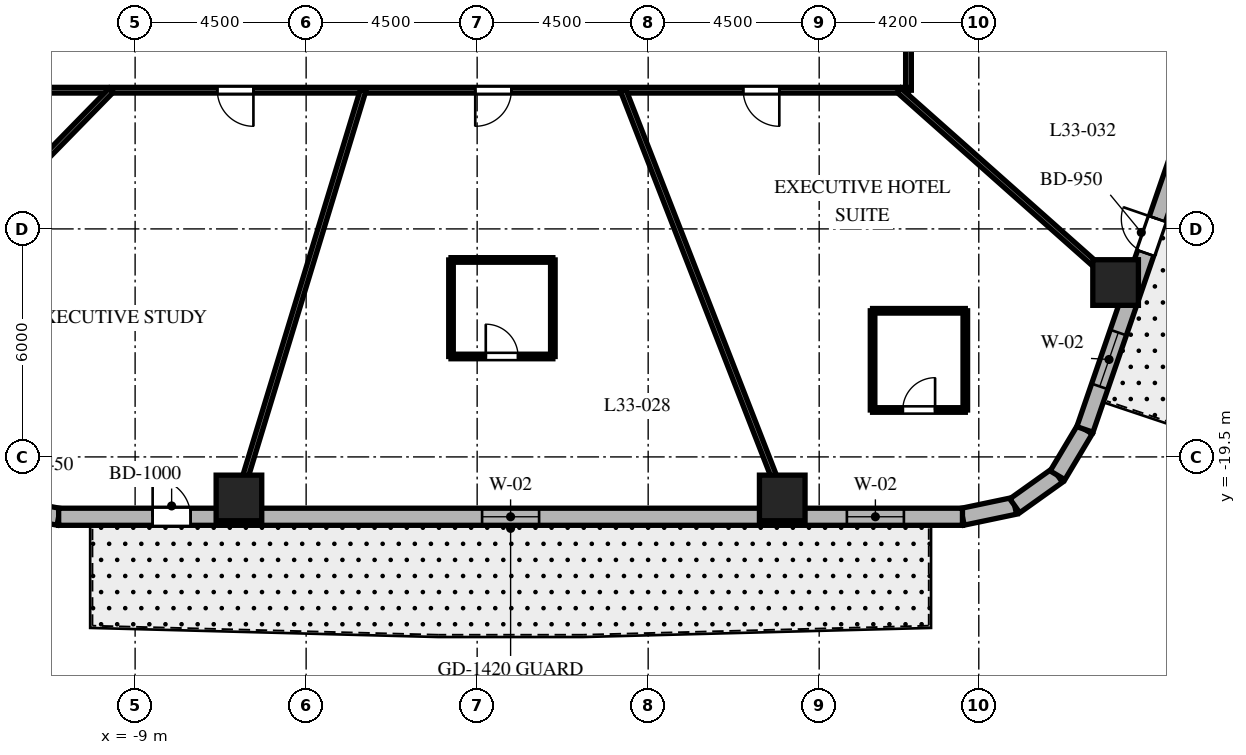
"""IFC4 building model, lengths in metres.
Left out: names, types, materials, properties, quantities, classifications, styles, units other than length and angle.
Written with IfcOpenShell. Run it as: python <this file> out.ifc"""

import sys

from ifc_helpers import new_model, si_unit, direction, frame, frame_2d, origin, origin_2d, place, context, subcontext, project, spatial, rectangle, extrude, element, fill, save


model = new_model("IFC4")
c1 = context("Model", 3, precision=1e-05, world=origin(), true_north=direction((0.0, 1.0)))
c2 = subcontext(c1, "Body", "Model", "MODEL_VIEW")
j1 = project(units=[si_unit("LENGTHUNIT", "METRE"), si_unit("PLANEANGLEUNIT", "RADIAN")], contexts=[c1])
p1 = place(None, origin())
s1 = spatial("IfcSite", under=j1, at=p1, CompositionType="ELEMENT")
p2 = place(p1, origin())
s2 = spatial("IfcBuilding", under=s1, at=p2, CompositionType="ELEMENT")
p3 = place(p2, frame((0.0, 0.0, 135.8)))
s3 = spatial("IfcBuildingStorey", under=s2, at=p3, CompositionType="ELEMENT", Elevation=135.8)
for number, where, z_axis, x_axis in (
    (1, (-6.268, -20.58, 0.0), (0.0, 0.0, 1.0), (1.0, 0.0, 0.0)),
    (2, (8.028, -20.58, 0.0), (0.0, 0.0, 1.0), (1.0, 0.0, 0.0)),
    (3, (16.8, -14.911, 0.0), (0.0, 0.0, 1.0), (1.0, 0.0, 0.0)),
):
    element("IfcColumn", number, at=place(p3, frame(where, z_axis=z_axis, x_axis=x_axis)), inside=s3, PredefinedType="COLUMN", context=c2, shape_type="SweptSolid", body=[
        extrude(rectangle(XDim=1.2, YDim=1.2, at=origin_2d()), origin(), (0.0, 0.0, 1.0), 3.7),
    ])
p4 = place(p3, frame((-12.259, -20.84, 0.0), z_axis=(0.0, 0.0, 1.0), x_axis=(0.982730354425, -0.185043374624, 0.0)))
e4 = element("IfcWall", 4, at=p4, inside=s3, PredefinedType="SOLIDWALL", context=c2, shape_type="SweptSolid", body=[
    extrude(rectangle(XDim=1.269, YDim=0.45, at=frame_2d((0.635, 0.0))), origin(), (0.0, 0.0, 1.0), 3.38),
])
p5 = place(p3, frame((12.771, -21.075, 0.0), z_axis=(0.0, 0.0, 1.0), x_axis=(0.97874281988, 0.205091424819, 0.0)))
e5 = element("IfcWall", 5, at=p5, inside=s3, PredefinedType="SOLIDWALL", context=c2, shape_type="SweptSolid", body=[
    extrude(rectangle(XDim=1.406, YDim=0.45, at=frame_2d((0.703, 0.0))), origin(), (0.0, 0.0, 1.0), 3.38),
])
p6 = place(p3, frame((14.146, -20.787, 0.0), z_axis=(0.0, 0.0, 1.0), x_axis=(0.814162929117, 0.580636482536, 0.0)))
e6 = element("IfcWall", 6, at=p6, inside=s3, PredefinedType="SOLIDWALL", context=c2, shape_type="SweptSolid", body=[
    extrude(rectangle(XDim=1.382, YDim=0.45, at=frame_2d((0.691, 0.0))), origin(), (0.0, 0.0, 1.0), 3.38),
])
p7 = place(p3, frame((15.272, -19.984, 0.0), z_axis=(0.0, 0.0, 1.0), x_axis=(0.512579347361, 0.858639862025, 0.0)))
e7 = element("IfcWall", 7, at=p7, inside=s3, PredefinedType="SOLIDWALL", context=c2, shape_type="SweptSolid", body=[
    extrude(rectangle(XDim=1.406, YDim=0.45, at=frame_2d((0.703, 0.0))), origin(), (0.0, 0.0, 1.0), 3.38),
])
p8 = place(p3, frame((-11.012, -21.075, 0.0), z_axis=(0.0, 0.0, 1.0), x_axis=(1.0, 0.0, 0.0)))
e8 = element("IfcWall", 8, at=p8, inside=s3, PredefinedType="SOLIDWALL", context=c2, shape_type="SweptSolid", body=[
    extrude(rectangle(XDim=23.782, YDim=0.45, at=frame_2d((11.891, 0.0))), origin(), (0.0, 0.0, 1.0), 3.38),
])
p9 = place(p8, frame((2.473, 0.0, 0.0)))
e9 = element("IfcOpeningElement", 9, at=p9, cuts=e8, PredefinedType="OPENING", context=c2, shape_type="SweptSolid", body=[
    extrude(rectangle(XDim=1.0, YDim=2.15, at=frame_2d((0.5, 1.075))), frame((0.0, 0.235, 0.0), z_axis=(0.0, -1.0, 0.0), x_axis=(1.0, 0.0, 0.0)), (0.0, 0.0, 1.0), 0.47),
])
p10 = place(p8, frame((11.142, 0.0, 0.8)))
e10 = element("IfcOpeningElement", 10, at=p10, cuts=e8, PredefinedType="OPENING", context=c2, shape_type="SweptSolid", body=[
    extrude(rectangle(XDim=1.5, YDim=1.8, at=frame_2d((0.75, 0.9))), frame((0.0, 0.235, 0.0), z_axis=(0.0, -1.0, 0.0), x_axis=(1.0, 0.0, 0.0)), (0.0, 0.0, 1.0), 0.47),
])
p11 = place(p8, frame((20.741, 0.0, 0.8)))
e11 = element("IfcOpeningElement", 11, at=p11, cuts=e8, PredefinedType="OPENING", context=c2, shape_type="SweptSolid", body=[
    extrude(rectangle(XDim=1.5, YDim=1.8, at=frame_2d((0.75, 0.9))), frame((0.0, 0.235, 0.0), z_axis=(0.0, -1.0, 0.0), x_axis=(1.0, 0.0, 0.0)), (0.0, 0.0, 1.0), 0.47),
])
p12 = place(p3, frame((15.992, -18.777, 0.0), z_axis=(0.0, 0.0, 1.0), x_axis=(0.325606988926, 0.945505202927, 0.0)))
e12 = element("IfcWall", 12, at=p12, inside=s3, PredefinedType="SOLIDWALL", context=c2, shape_type="SweptSolid", body=[
    extrude(rectangle(XDim=19.669, YDim=0.45, at=frame_2d((9.835, 0.0))), origin(), (0.0, 0.0, 1.0), 3.38),
])
p13 = place(p12, frame((4.909, 0.0, 0.0)))
e13 = element("IfcOpeningElement", 13, at=p13, cuts=e12, PredefinedType="OPENING", context=c2, shape_type="SweptSolid", body=[
    extrude(rectangle(XDim=0.95, YDim=2.15, at=frame_2d((0.475, 1.075))), frame((0.0, 0.235, 0.0), z_axis=(0.0, -1.0, 0.0), x_axis=(1.0, 0.0, 0.0)), (0.0, 0.0, 1.0), 0.47),
])
p14 = place(p12, frame((1.197, 0.0, 0.8)))
e14 = element("IfcOpeningElement", 14, at=p14, cuts=e12, PredefinedType="OPENING", context=c2, shape_type="SweptSolid", body=[
    extrude(rectangle(XDim=1.5, YDim=1.8, at=frame_2d((0.75, 0.9))), frame((0.0, 0.235, 0.0), z_axis=(0.0, -1.0, 0.0), x_axis=(1.0, 0.0, 0.0)), (0.0, 0.0, 1.0), 0.47),
])
p15 = place(p12, frame((9.03, 0.0, 0.8)))
e15 = element("IfcOpeningElement", 15, at=p15, cuts=e12, PredefinedType="OPENING", context=c2, shape_type="SweptSolid", body=[
    extrude(rectangle(XDim=1.5, YDim=1.8, at=frame_2d((0.75, 0.9))), frame((0.0, 0.235, 0.0), z_axis=(0.0, -1.0, 0.0), x_axis=(1.0, 0.0, 0.0)), (0.0, 0.0, 1.0), 0.47),
])
p16 = place(p12, frame((16.918, 0.0, 0.8)))
e16 = element("IfcOpeningElement", 16, at=p16, cuts=e12, PredefinedType="OPENING", context=c2, shape_type="SweptSolid", body=[
    extrude(rectangle(XDim=1.5, YDim=1.8, at=frame_2d((0.75, 0.9))), frame((0.0, 0.235, 0.0), z_axis=(0.0, -1.0, 0.0), x_axis=(1.0, 0.0, 0.0)), (0.0, 0.0, 1.0), 0.47),
])
p17 = place(p3, frame((11.35, 9.85, 0.0), z_axis=(0.0, 0.0, 1.0), x_axis=(0.0, -1.0, 0.0)))
e17 = element("IfcWall", 17, at=p17, inside=s3, PredefinedType="PARTITIONING", context=c2, shape_type="SweptSolid", body=[
    extrude(rectangle(XDim=19.7, YDim=0.15, at=frame_2d((9.85, 0.0))), origin(), (0.0, 0.0, 1.0), 2.82),
])
p18 = place(p17, frame((3.008, 0.0, 0.0)))
e18 = element("IfcOpeningElement", 18, at=p18, cuts=e17, PredefinedType="OPENING", context=c2, shape_type="SweptSolid", body=[
    extrude(rectangle(XDim=0.95, YDim=2.03, at=frame_2d((0.475, 1.015))), frame((0.0, 0.085, 0.0), z_axis=(0.0, -1.0, 0.0), x_axis=(1.0, 0.0, 0.0)), (0.0, 0.0, 1.0), 0.17),
])
p19 = place(p17, frame((15.205, 0.0, 0.0)))
e19 = element("IfcOpeningElement", 19, at=p19, cuts=e17, PredefinedType="OPENING", context=c2, shape_type="SweptSolid", body=[
    extrude(rectangle(XDim=0.95, YDim=2.03, at=frame_2d((0.475, 1.015))), frame((0.0, 0.085, 0.0), z_axis=(0.0, -1.0, 0.0), x_axis=(1.0, 0.0, 0.0)), (0.0, 0.0, 1.0), 0.17),
])
p20 = place(p17, frame((8.836, 0.0, 0.0)))
e20 = element("IfcOpeningElement", 20, at=p20, cuts=e17, PredefinedType="OPENING", context=c2, shape_type="SweptSolid", body=[
    extrude(rectangle(XDim=0.95, YDim=2.03, at=frame_2d((0.475, 1.015))), frame((0.0, 0.085, 0.0), z_axis=(0.0, -1.0, 0.0), x_axis=(1.0, 0.0, 0.0)), (0.0, 0.0, 1.0), 0.17),
])
p21 = place(p3, frame((11.35, -9.85, 0.0), z_axis=(0.0, 0.0, 1.0), x_axis=(-1.0, 0.0, 0.0)))
e21 = element("IfcWall", 21, at=p21, inside=s3, PredefinedType="PARTITIONING", context=c2, shape_type="SweptSolid", body=[
    extrude(rectangle(XDim=22.7, YDim=0.15, at=frame_2d((11.35, 0.0))), origin(), (0.0, 0.0, 1.0), 2.82),
])
p22 = place(p21, frame((17.237, 0.0, 0.0)))
e22 = element("IfcOpeningElement", 22, at=p22, cuts=e21, PredefinedType="OPENING", context=c2, shape_type="SweptSolid", body=[
    extrude(rectangle(XDim=0.95, YDim=2.03, at=frame_2d((0.475, 1.015))), frame((0.0, 0.085, 0.0), z_axis=(0.0, -1.0, 0.0), x_axis=(1.0, 0.0, 0.0)), (0.0, 0.0, 1.0), 0.17),
])
p23 = place(p21, frame((10.45, 0.0, 0.0)))
e23 = element("IfcOpeningElement", 23, at=p23, cuts=e21, PredefinedType="OPENING", context=c2, shape_type="SweptSolid", body=[
    extrude(rectangle(XDim=0.95, YDim=2.03, at=frame_2d((0.475, 1.015))), frame((0.0, 0.085, 0.0), z_axis=(0.0, -1.0, 0.0), x_axis=(1.0, 0.0, 0.0)), (0.0, 0.0, 1.0), 0.17),
])
p24 = place(p21, frame((3.399, 0.0, 0.0)))
e24 = element("IfcOpeningElement", 24, at=p24, cuts=e21, PredefinedType="OPENING", context=c2, shape_type="SweptSolid", body=[
    extrude(rectangle(XDim=0.95, YDim=2.03, at=frame_2d((0.475, 1.015))), frame((0.0, 0.085, 0.0), z_axis=(0.0, -1.0, 0.0), x_axis=(1.0, 0.0, 0.0)), (0.0, 0.0, 1.0), 0.17),
])
p25 = place(p3, frame((-9.628, -9.85, 0.0), z_axis=(0.0, 0.0, 1.0), x_axis=(-0.698992824326, -0.715128681805, 0.0)))
e25 = element("IfcWall", 25, at=p25, inside=s3, PredefinedType="PARTITIONING", context=c2, shape_type="SweptSolid", body=[
    extrude(rectangle(XDim=8.579, YDim=0.15, at=frame_2d((4.29, 0.0))), origin(), (0.0, 0.0, 1.0), 2.52),
])
p26 = place(p3, frame((-3.0, -9.85, 0.0), z_axis=(0.0, 0.0, 1.0), x_axis=(-0.291352035382, -0.95661590593, 0.0)))
e26 = element("IfcWall", 26, at=p26, inside=s3, PredefinedType="PARTITIONING", context=c2, shape_type="SweptSolid", body=[
    extrude(rectangle(XDim=11.734, YDim=0.15, at=frame_2d((5.867, 0.0))), origin(), (0.0, 0.0, 1.0), 2.52),
])
p27 = place(p3, frame((3.842, -9.85, 0.0), z_axis=(0.0, 0.0, 1.0), x_axis=(0.363432685593, -0.931620460833, 0.0)))
e27 = element("IfcWall", 27, at=p27, inside=s3, PredefinedType="PARTITIONING", context=c2, shape_type="SweptSolid", body=[
    extrude(rectangle(XDim=12.049, YDim=0.15, at=frame_2d((6.024, 0.0))), origin(), (0.0, 0.0, 1.0), 2.52),
])
p28 = place(p3, frame((11.098, -9.85, 0.0), z_axis=(0.0, 0.0, 1.0), x_axis=(0.747904295103, -0.663806572253, 0.0)))
e28 = element("IfcWall", 28, at=p28, inside=s3, PredefinedType="PARTITIONING", context=c2, shape_type="SweptSolid", body=[
    extrude(rectangle(XDim=8.16, YDim=0.15, at=frame_2d((4.08, 0.0))), origin(), (0.0, 0.0, 1.0), 2.52),
])
p29 = place(p3, frame((-0.688, -16.857, 0.0), z_axis=(0.0, 0.0, 1.0), x_axis=(1.0, 0.0, 0.0)))
e29 = element("IfcWall", 29, at=p29, inside=s3, PredefinedType="PARTITIONING", context=c2, shape_type="SweptSolid", body=[
    extrude(rectangle(XDim=2.68, YDim=0.12, at=frame_2d((1.34, 0.0))), origin(), (0.0, 0.0, 1.0), 3.38),
])
p30 = place(p29, frame((0.915, 0.0, 0.0)))
e30 = element("IfcOpeningElement", 30, at=p30, cuts=e29, PredefinedType="OPENING", context=c2, shape_type="SweptSolid", body=[
    extrude(rectangle(XDim=0.85, YDim=2.03, at=frame_2d((0.425, 1.015))), frame((0.0, 0.07, 0.0), z_axis=(0.0, -1.0, 0.0), x_axis=(1.0, 0.0, 0.0)), (0.0, 0.0, 1.0), 0.14),
])
p31 = place(p3, frame((1.992, -16.857, 0.0), z_axis=(0.0, 0.0, 1.0), x_axis=(0.0, 1.0, 0.0)))
e31 = element("IfcWall", 31, at=p31, inside=s3, PredefinedType="PARTITIONING", context=c2, shape_type="SweptSolid", body=[
    extrude(rectangle(XDim=2.54, YDim=0.12, at=frame_2d((1.27, 0.0))), origin(), (0.0, 0.0, 1.0), 2.821),
])
p32 = place(p3, frame((1.992, -14.317, 0.0), z_axis=(0.0, 0.0, 1.0), x_axis=(-1.0, 0.0, 0.0)))
e32 = element("IfcWall", 32, at=p32, inside=s3, PredefinedType="PARTITIONING", context=c2, shape_type="SweptSolid", body=[
    extrude(rectangle(XDim=2.68, YDim=0.12, at=frame_2d((1.34, 0.0))), origin(), (0.0, 0.0, 1.0), 3.38),
])
p33 = place(p3, frame((-0.688, -14.317, 0.0), z_axis=(0.0, 0.0, 1.0), x_axis=(0.0, -1.0, 0.0)))
e33 = element("IfcWall", 33, at=p33, inside=s3, PredefinedType="PARTITIONING", context=c2, shape_type="SweptSolid", body=[
    extrude(rectangle(XDim=2.54, YDim=0.12, at=frame_2d((1.27, 0.0))), origin(), (0.0, 0.0, 1.0), 2.821),
])
p34 = place(p3, frame((10.405, -18.265, 0.0), z_axis=(0.0, 0.0, 1.0), x_axis=(1.0, 0.0, 0.0)))
e34 = element("IfcWall", 34, at=p34, inside=s3, PredefinedType="PARTITIONING", context=c2, shape_type="SweptSolid", body=[
    extrude(rectangle(XDim=2.44, YDim=0.12, at=frame_2d((1.22, 0.0))), origin(), (0.0, 0.0, 1.0), 2.52),
])
p35 = place(p34, frame((0.795, 0.0, 0.0)))
e35 = element("IfcOpeningElement", 35, at=p35, cuts=e34, PredefinedType="OPENING", context=c2, shape_type="SweptSolid", body=[
    extrude(rectangle(XDim=0.85, YDim=2.03, at=frame_2d((0.425, 1.015))), frame((0.0, 0.07, 0.0), z_axis=(0.0, -1.0, 0.0), x_axis=(1.0, 0.0, 0.0)), (0.0, 0.0, 1.0), 0.14),
])
p36 = place(p3, frame((12.845, -18.265, 0.0), z_axis=(0.0, 0.0, 1.0), x_axis=(0.0, 1.0, 0.0)))
e36 = element("IfcWall", 36, at=p36, inside=s3, PredefinedType="PARTITIONING", context=c2, shape_type="SweptSolid", body=[
    extrude(rectangle(XDim=2.61, YDim=0.12, at=frame_2d((1.305, 0.0))), origin(), (0.0, 0.0, 1.0), 2.52),
])
p37 = place(p3, frame((12.845, -15.655, 0.0), z_axis=(0.0, 0.0, 1.0), x_axis=(-1.0, 0.0, 0.0)))
e37 = element("IfcWall", 37, at=p37, inside=s3, PredefinedType="PARTITIONING", context=c2, shape_type="SweptSolid", body=[
    extrude(rectangle(XDim=2.44, YDim=0.12, at=frame_2d((1.22, 0.0))), origin(), (0.0, 0.0, 1.0), 3.38),
])
p38 = place(p3, frame((10.405, -15.655, 0.0), z_axis=(0.0, 0.0, 1.0), x_axis=(0.0, -1.0, 0.0)))
e38 = element("IfcWall", 38, at=p38, inside=s3, PredefinedType="PARTITIONING", context=c2, shape_type="SweptSolid", body=[
    extrude(rectangle(XDim=2.61, YDim=0.12, at=frame_2d((1.305, 0.0))), origin(), (0.0, 0.0, 1.0), 3.38),
])
p39 = place(p9, origin())
e39 = element("IfcDoor", 39, at=p39, inside=s3, OperationType="SINGLE_SWING_LEFT", PredefinedType="DOOR", context=c2, shape_type="SweptSolid", body=[
    extrude(rectangle(XDim=1.0, YDim=2.15, at=frame_2d((0.5, 1.075))), frame((0.0, 0.025, 0.0), z_axis=(0.0, -1.0, 0.0), x_axis=(1.0, 0.0, 0.0)), (0.0, 0.0, 1.0), 0.05),
])
fill(e9, e39)
p40 = place(p10, origin())
e40 = element("IfcWindow", 40, at=p40, inside=s3, PartitioningType="SINGLE_PANEL", PredefinedType="WINDOW", context=c2, shape_type="SweptSolid", body=[
    extrude(rectangle(XDim=1.5, YDim=1.8, at=frame_2d((0.75, 0.9))), frame((0.0, 0.03, 0.0), z_axis=(0.0, -1.0, 0.0), x_axis=(1.0, 0.0, 0.0)), (0.0, 0.0, 1.0), 0.06),
])
fill(e10, e40)
p41 = place(p11, origin())
e41 = element("IfcWindow", 41, at=p41, inside=s3, PartitioningType="SINGLE_PANEL", PredefinedType="WINDOW", context=c2, shape_type="SweptSolid", body=[
    extrude(rectangle(XDim=1.5, YDim=1.8, at=frame_2d((0.75, 0.9))), frame((0.0, 0.03, 0.0), z_axis=(0.0, -1.0, 0.0), x_axis=(1.0, 0.0, 0.0)), (0.0, 0.0, 1.0), 0.06),
])
fill(e11, e41)
p42 = place(p13, origin())
e42 = element("IfcDoor", 42, at=p42, inside=s3, OperationType="SINGLE_SWING_RIGHT", PredefinedType="DOOR", context=c2, shape_type="SweptSolid", body=[
    extrude(rectangle(XDim=0.95, YDim=2.15, at=frame_2d((0.475, 1.075))), frame((0.0, 0.025, 0.0), z_axis=(0.0, -1.0, 0.0), x_axis=(1.0, 0.0, 0.0)), (0.0, 0.0, 1.0), 0.05),
])
fill(e13, e42)
p43 = place(p14, origin())
e43 = element("IfcWindow", 43, at=p43, inside=s3, PartitioningType="SINGLE_PANEL", PredefinedType="WINDOW", context=c2, shape_type="SweptSolid", body=[
    extrude(rectangle(XDim=1.5, YDim=1.8, at=frame_2d((0.75, 0.9))), frame((0.0, 0.03, 0.0), z_axis=(0.0, -1.0, 0.0), x_axis=(1.0, 0.0, 0.0)), (0.0, 0.0, 1.0), 0.06),
])
fill(e14, e43)
p44 = place(p22, origin())
e44 = element("IfcDoor", 44, at=p44, inside=s3, OperationType="SINGLE_SWING_LEFT", PredefinedType="DOOR", context=c2, shape_type="SweptSolid", body=[
    extrude(rectangle(XDim=0.95, YDim=2.03, at=frame_2d((0.475, 1.015))), frame((0.0, 0.025, 0.0), z_axis=(0.0, -1.0, 0.0), x_axis=(1.0, 0.0, 0.0)), (0.0, 0.0, 1.0), 0.05),
])
fill(e22, e44)
p45 = place(p23, origin())
e45 = element("IfcDoor", 45, at=p45, inside=s3, OperationType="SINGLE_SWING_RIGHT", PredefinedType="DOOR", context=c2, shape_type="SweptSolid", body=[
    extrude(rectangle(XDim=0.95, YDim=2.03, at=frame_2d((0.475, 1.015))), frame((0.0, 0.025, 0.0), z_axis=(0.0, -1.0, 0.0), x_axis=(1.0, 0.0, 0.0)), (0.0, 0.0, 1.0), 0.05),
])
fill(e23, e45)
p46 = place(p30, origin())
e46 = element("IfcDoor", 46, at=p46, inside=s3, OperationType="SINGLE_SWING_LEFT", PredefinedType="DOOR", context=c2, shape_type="SweptSolid", body=[
    extrude(rectangle(XDim=0.85, YDim=2.03, at=frame_2d((0.425, 1.015))), frame((0.0, 0.025, 0.0), z_axis=(0.0, -1.0, 0.0), x_axis=(1.0, 0.0, 0.0)), (0.0, 0.0, 1.0), 0.05),
])
fill(e30, e46)
p47 = place(p24, origin())
e47 = element("IfcDoor", 47, at=p47, inside=s3, OperationType="SINGLE_SWING_LEFT", PredefinedType="DOOR", context=c2, shape_type="SweptSolid", body=[
    extrude(rectangle(XDim=0.95, YDim=2.03, at=frame_2d((0.475, 1.015))), frame((0.0, 0.025, 0.0), z_axis=(0.0, -1.0, 0.0), x_axis=(1.0, 0.0, 0.0)), (0.0, 0.0, 1.0), 0.05),
])
fill(e24, e47)
p48 = place(p35, origin())
e48 = element("IfcDoor", 48, at=p48, inside=s3, OperationType="SINGLE_SWING_RIGHT", PredefinedType="DOOR", context=c2, shape_type="SweptSolid", body=[
    extrude(rectangle(XDim=0.85, YDim=2.03, at=frame_2d((0.425, 1.015))), frame((0.0, 0.025, 0.0), z_axis=(0.0, -1.0, 0.0), x_axis=(1.0, 0.0, 0.0)), (0.0, 0.0, 1.0), 0.05),
])
fill(e35, e48)
save(model, sys.argv[1])
